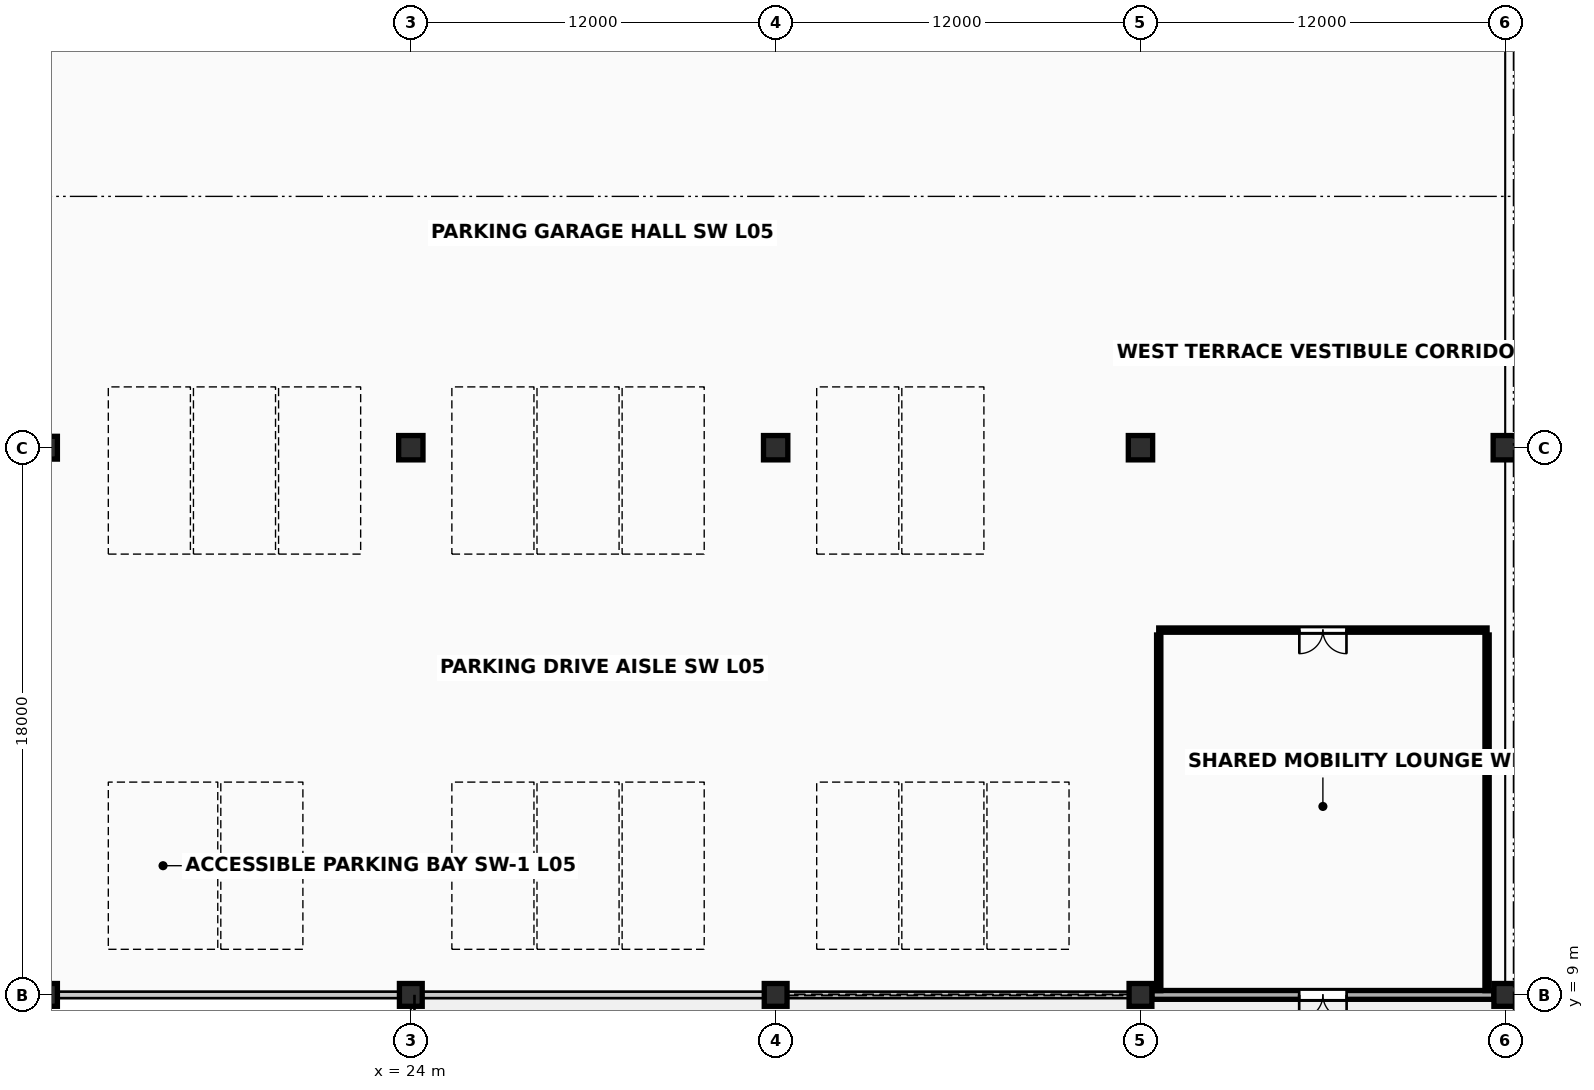
"""IFC4 building model, lengths in metres.
Left out: names, types, materials, properties, quantities, classifications, styles, units other than length and angle.
Written with IfcOpenShell. Run it as: python <this file> out.ifc"""

import sys

from ifc_helpers import new_model, si_unit, direction, frame, frame_2d, origin, origin_2d, place, context, subcontext, project, spatial, rectangle, extrude, element, fill, save


model = new_model("IFC4")
c1 = context("Model", 3, precision=1e-05, world=origin(), true_north=direction((0.0, 1.0)))
c2 = subcontext(c1, "Body", "Model", "MODEL_VIEW")
j1 = project(units=[si_unit("LENGTHUNIT", "METRE"), si_unit("PLANEANGLEUNIT", "RADIAN")], contexts=[c1])
p1 = place(None, origin())
s1 = spatial("IfcSite", under=j1, at=p1, CompositionType="ELEMENT")
p2 = place(p1, origin())
s2 = spatial("IfcBuilding", under=s1, at=p2, CompositionType="ELEMENT")
p3 = place(p2, frame((0.0, 0.0, 21.0)))
s3 = spatial("IfcBuildingStorey", under=s2, at=p3, CompositionType="ELEMENT", Elevation=21.0)
for number, where, z_axis, x_axis in (
    (1, (12.0, 9.0, 0.0), (0.0, 0.0, 1.0), (1.0, 0.0, 0.0)),
    (2, (12.0, 27.0, 0.0), (0.0, 0.0, 1.0), (1.0, 0.0, 0.0)),
    (3, (24.0, 9.0, 0.0), (0.0, 0.0, 1.0), (1.0, 0.0, 0.0)),
):
    element("IfcColumn", number, at=place(p3, frame(where, z_axis=z_axis, x_axis=x_axis)), inside=s3, PredefinedType="COLUMN", context=c2, shape_type="SweptSolid", body=[
        extrude(rectangle(XDim=0.75, YDim=0.75, at=origin_2d()), origin(), (0.0, 0.0, 1.0), 3.8),
    ])
p4 = place(p3, frame((24.0, 27.0, 0.0), z_axis=(0.0, 0.0, 1.0), x_axis=(1.0, 0.0, 0.0)))
e4 = element("IfcColumn", 4, at=p4, inside=s3, PredefinedType="COLUMN", context=c2, shape_type="SweptSolid", body=[
    extrude(rectangle(XDim=0.8, YDim=0.8, at=origin_2d()), origin(), (0.0, 0.0, 1.0), 3.8),
])
p5 = place(p3, frame((36.0, 9.0, 0.0), z_axis=(0.0, 0.0, 1.0), x_axis=(1.0, 0.0, 0.0)))
e5 = element("IfcColumn", 5, at=p5, inside=s3, PredefinedType="COLUMN", context=c2, shape_type="SweptSolid", body=[
    extrude(rectangle(XDim=0.75, YDim=0.75, at=origin_2d()), origin(), (0.0, 0.0, 1.0), 3.8),
])
p6 = place(p3, frame((36.0, 27.0, 0.0), z_axis=(0.0, 0.0, 1.0), x_axis=(1.0, 0.0, 0.0)))
e6 = element("IfcColumn", 6, at=p6, inside=s3, PredefinedType="COLUMN", context=c2, shape_type="SweptSolid", body=[
    extrude(rectangle(XDim=0.8, YDim=0.8, at=origin_2d()), origin(), (0.0, 0.0, 1.0), 3.8),
])
p7 = place(p3, frame((48.0, 9.0, 0.0), z_axis=(0.0, 0.0, 1.0), x_axis=(1.0, 0.0, 0.0)))
e7 = element("IfcColumn", 7, at=p7, inside=s3, PredefinedType="COLUMN", context=c2, shape_type="SweptSolid", body=[
    extrude(rectangle(XDim=0.75, YDim=0.75, at=origin_2d()), origin(), (0.0, 0.0, 1.0), 3.8),
])
p8 = place(p3, frame((48.0, 27.0, 0.0), z_axis=(0.0, 0.0, 1.0), x_axis=(1.0, 0.0, 0.0)))
e8 = element("IfcColumn", 8, at=p8, inside=s3, PredefinedType="COLUMN", context=c2, shape_type="SweptSolid", body=[
    extrude(rectangle(XDim=0.8, YDim=0.8, at=origin_2d()), origin(), (0.0, 0.0, 1.0), 3.8),
])
p9 = place(p3, frame((60.0, 9.0, 0.0), z_axis=(0.0, 0.0, 1.0), x_axis=(1.0, 0.0, 0.0)))
e9 = element("IfcColumn", 9, at=p9, inside=s3, PredefinedType="COLUMN", context=c2, shape_type="SweptSolid", body=[
    extrude(rectangle(XDim=0.75, YDim=0.75, at=origin_2d()), origin(), (0.0, 0.0, 1.0), 3.8),
])
p10 = place(p3, frame((60.0, 27.0, 0.0), z_axis=(0.0, 0.0, 1.0), x_axis=(1.0, 0.0, 0.0)))
e10 = element("IfcColumn", 10, at=p10, inside=s3, PredefinedType="COLUMN", context=c2, shape_type="SweptSolid", body=[
    extrude(rectangle(XDim=0.8, YDim=0.8, at=origin_2d()), origin(), (0.0, 0.0, 1.0), 3.8),
])
for number, where, z_axis, x_axis in (
    (11, (12.373, 9.0, 0.0), (0.0, 0.0, 1.0), (1.0, 0.0, 0.0)),
    (12, (24.373, 9.0, 0.0), (0.0, 0.0, 1.0), (1.0, 0.0, 0.0)),
    (13, (36.373, 9.0, 0.0), (0.0, 0.0, 1.0), (1.0, 0.0, 0.0)),
):
    element("IfcWall", number, at=place(p3, frame(where, z_axis=z_axis, x_axis=x_axis)), inside=s3, PredefinedType="PARAPET", context=c2, shape_type="SweptSolid", body=[
        extrude(rectangle(XDim=11.254, YDim=0.215, at=frame_2d((5.627, 0.0))), origin(), (0.0, 0.0, 1.0), 1.15),
    ])
p11 = place(p3, frame((48.373, 9.0, 0.0), z_axis=(0.0, 0.0, 1.0), x_axis=(1.0, 0.0, 0.0)))
e14 = element("IfcWall", 14, at=p11, inside=s3, PredefinedType="SOLIDWALL", context=c2, shape_type="SweptSolid", body=[
    extrude(rectangle(XDim=11.254, YDim=0.29, at=frame_2d((5.627, 0.0))), origin(), (0.0, 0.0, 1.0), 2.385),
])
p12 = place(p11, frame((4.847, 0.0, 0.0)))
e15 = element("IfcOpeningElement", 15, at=p12, cuts=e14, PredefinedType="OPENING", context=c2, shape_type="SweptSolid", body=[
    extrude(rectangle(XDim=1.56, YDim=2.3, at=frame_2d((0.78, 1.15))), frame((0.0, 0.16, 0.0), z_axis=(0.0, -1.0, 0.0), x_axis=(1.0, 0.0, 0.0)), (0.0, 0.0, 1.0), 0.32),
])
p13 = place(p3, frame((48.6, 21.0, 0.0), z_axis=(0.0, 0.0, 1.0), x_axis=(1.0, 0.0, 0.0)))
e16 = element("IfcWall", 16, at=p13, inside=s3, PredefinedType="PARTITIONING", context=c2, shape_type="SweptSolid", body=[
    extrude(rectangle(XDim=10.8, YDim=0.14, at=frame_2d((5.4, 0.0))), origin(), (0.0, 0.0, 1.0), 2.75),
])
p14 = place(p13, frame((4.625, 0.0, 0.0)))
e17 = element("IfcOpeningElement", 17, at=p14, cuts=e16, PredefinedType="OPENING", context=c2, shape_type="SweptSolid", body=[
    extrude(rectangle(XDim=1.55, YDim=2.31, at=frame_2d((0.775, 1.155))), frame((0.0, 0.085, 0.0), z_axis=(0.0, -1.0, 0.0), x_axis=(1.0, 0.0, 0.0)), (0.0, 0.0, 1.0), 0.17),
])
for number, where, z_axis, x_axis in (
    (18, (48.6, 9.14, 0.0), (0.0, 0.0, 1.0), (0.0, 1.0, 0.0)),
    (19, (59.4, 9.14, 0.0), (0.0, 0.0, 1.0), (0.0, 1.0, 0.0)),
):
    element("IfcWall", number, at=place(p3, frame(where, z_axis=z_axis, x_axis=x_axis)), inside=s3, PredefinedType="PARTITIONING", context=c2, shape_type="SweptSolid", body=[
        extrude(rectangle(XDim=11.7, YDim=0.14, at=frame_2d((5.85, 0.0))), origin(), (0.0, 0.0, 1.0), 2.75),
    ])
p15 = place(p12, origin())
e20 = element("IfcDoor", 20, at=p15, inside=s3, OperationType="DOUBLE_DOOR_SINGLE_SWING", PredefinedType="DOOR", context=c2, shape_type="SweptSolid", body=[
    extrude(rectangle(XDim=1.56, YDim=2.3, at=frame_2d((0.78, 1.15))), frame((0.0, 0.025, 0.0), z_axis=(0.0, -1.0, 0.0), x_axis=(1.0, 0.0, 0.0)), (0.0, 0.0, 1.0), 0.05),
])
fill(e15, e20)
p16 = place(p14, origin())
e21 = element("IfcDoor", 21, at=p16, inside=s3, OperationType="DOUBLE_DOOR_SINGLE_SWING", PredefinedType="DOOR", context=c2, shape_type="SweptSolid", body=[
    extrude(rectangle(XDim=1.55, YDim=2.31, at=frame_2d((0.775, 1.155))), frame((0.0, 0.025, 0.0), z_axis=(0.0, -1.0, 0.0), x_axis=(1.0, 0.0, 0.0)), (0.0, 0.0, 1.0), 0.05),
])
fill(e17, e21)
save(model, sys.argv[1])
